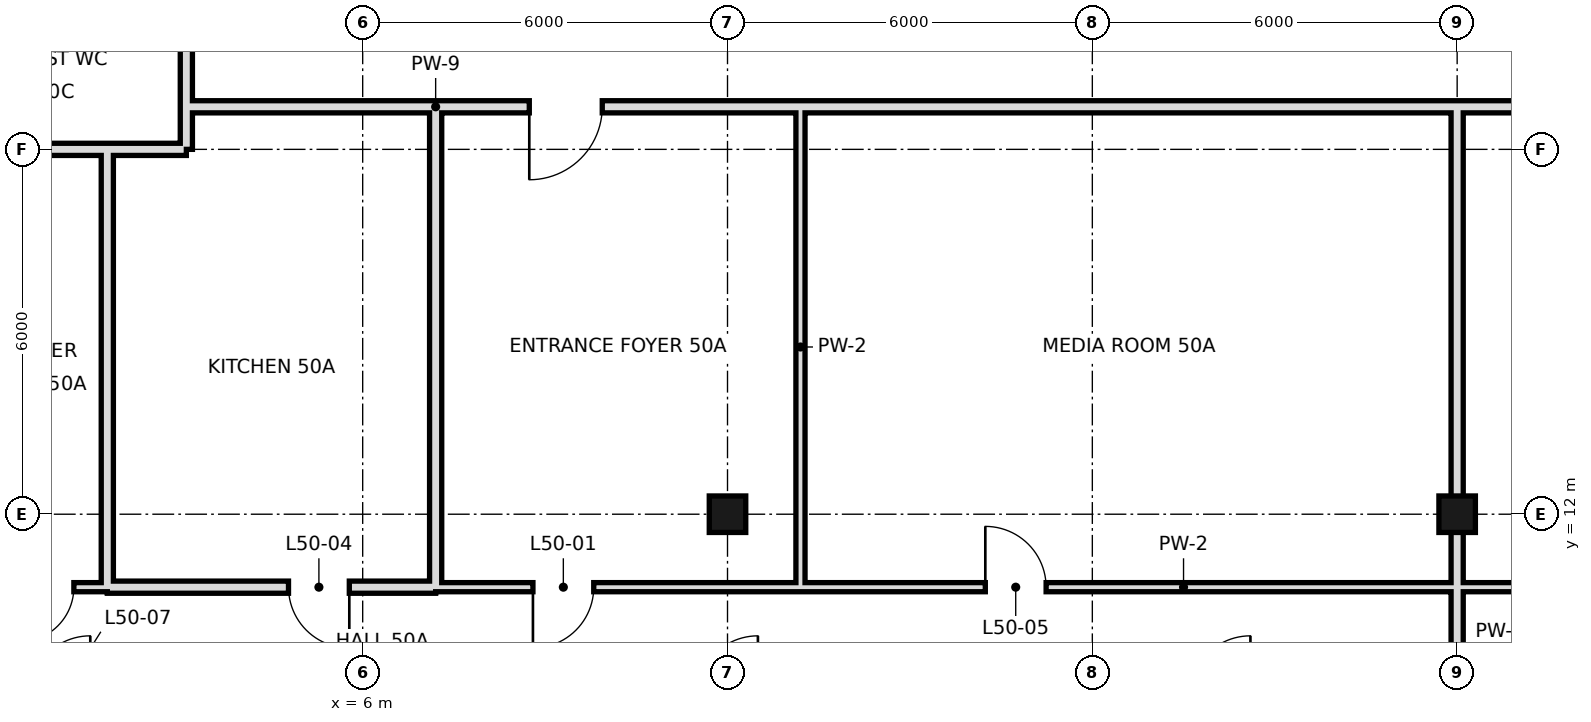
"""IFC4 building model, lengths in metres.
Left out: names, types, materials, properties, quantities, classifications, styles, units other than length and angle.
Written with IfcOpenShell. Run it as: python <this file> out.ifc"""

import sys

from ifc_helpers import new_model, si_unit, direction, frame, frame_2d, origin, origin_2d, place, context, subcontext, project, spatial, rectangle, hollow_rectangle, extrude, element, fill, save


model = new_model("IFC4")
c1 = context("Model", 3, precision=1e-05, world=origin(), true_north=direction((0.0, 1.0)))
c2 = subcontext(c1, "Body", "Model", "MODEL_VIEW")
j1 = project(units=[si_unit("LENGTHUNIT", "METRE"), si_unit("PLANEANGLEUNIT", "RADIAN")], contexts=[c1])
p1 = place(None, origin())
s1 = spatial("IfcSite", under=j1, at=p1, CompositionType="ELEMENT")
p2 = place(p1, origin())
s2 = spatial("IfcBuilding", under=s1, at=p2, CompositionType="ELEMENT")
p3 = place(p2, frame((0.0, 0.0, 215.4)))
s3 = spatial("IfcBuildingStorey", under=s2, at=p3, CompositionType="ELEMENT", Elevation=215.4)
for number, where, z_axis, x_axis in (
    (1, (12.0, 12.0, 0.0), (0.0, 0.0, 1.0), (1.0, 0.0, 0.0)),
    (2, (24.0, 12.0, 0.0), (0.0, 0.0, 1.0), (1.0, 0.0, 0.0)),
):
    element("IfcColumn", number, at=place(p3, frame(where, z_axis=z_axis, x_axis=x_axis)), inside=s3, PredefinedType="COLUMN", context=c2, shape_type="SweptSolid", body=[
        extrude(hollow_rectangle(XDim=0.6, YDim=0.6, WallThickness=0.028, at=origin_2d()), origin(), (0.0, 0.0, 1.0), 3.6),
    ])
p4 = place(p3, frame((1.8, 10.8, 0.0), z_axis=(0.0, 0.0, 1.0), x_axis=(0.0, 1.0, 0.0)))
e3 = element("IfcWall", 3, at=p4, inside=s3, PredefinedType="SOLIDWALL", context=c2, shape_type="SweptSolid", body=[
    extrude(rectangle(XDim=7.2, YDim=0.2, at=frame_2d((3.6, 0.0))), origin(), (0.0, 0.0, 1.0), 3.42),
])
p5 = place(p3, frame((13.2, 10.8, 0.0), z_axis=(0.0, 0.0, 1.0), x_axis=(0.0, 1.0, 0.0)))
e4 = element("IfcWall", 4, at=p5, inside=s3, PredefinedType="PARTITIONING", context=c2, shape_type="SweptSolid", body=[
    extrude(rectangle(XDim=7.9, YDim=0.15, at=frame_2d((3.95, 0.0))), origin(), (0.0, 0.0, 1.0), 3.42),
])
p6 = place(p3, frame((24.0, 0.0, 0.0), z_axis=(0.0, 0.0, 1.0), x_axis=(0.0, 1.0, 0.0)))
e5 = element("IfcWall", 5, at=p6, inside=s3, PredefinedType="SOLIDWALL", context=c2, shape_type="SweptSolid", body=[
    extrude(rectangle(XDim=18.7, YDim=0.2, at=frame_2d((9.35, 0.0))), origin(), (0.0, 0.0, 1.0), 2.72),
])
p7 = place(p3, frame((3.1, 18.7, 0.0), z_axis=(0.0, 0.0, 1.0), x_axis=(0.0, 1.0, 0.0)))
e6 = element("IfcWall", 6, at=p7, inside=s3, PredefinedType="SOLIDWALL", context=c2, shape_type="SweptSolid", body=[
    extrude(rectangle(XDim=15.5, YDim=0.2, at=frame_2d((7.75, 0.0))), origin(), (0.0, 0.0, 1.0), 2.97),
])
p8 = place(p7, frame((4.96, 0.0, 0.0)))
e7 = element("IfcOpeningElement", 7, at=p8, cuts=e6, PredefinedType="OPENING", context=c2, shape_type="SweptSolid", body=[
    extrude(rectangle(XDim=1.2, YDim=2.4, at=frame_2d((0.6, 1.2))), frame((0.0, 0.11, 0.0), z_axis=(0.0, -1.0, 0.0), x_axis=(1.0, 0.0, 0.0)), (0.0, 0.0, 1.0), 0.22),
])
p9 = place(p3, frame((3.1, 18.0, 0.0), z_axis=(0.0, 0.0, 1.0), x_axis=(0.0, 1.0, 0.0)))
e8 = element("IfcWall", 8, at=p9, inside=s3, PredefinedType="SOLIDWALL", context=c2, shape_type="SweptSolid", body=[
    extrude(rectangle(XDim=0.7, YDim=0.2, at=frame_2d((0.35, 0.0))), origin(), (0.0, 0.0, 1.0), 2.97),
])
p10 = place(p3, frame((7.2, 10.8, 0.0), z_axis=(0.0, 0.0, 1.0), x_axis=(0.0, 1.0, 0.0)))
e9 = element("IfcWall", 9, at=p10, inside=s3, PredefinedType="SOLIDWALL", context=c2, shape_type="SweptSolid", body=[
    extrude(rectangle(XDim=7.9, YDim=0.2, at=frame_2d((3.95, 0.0))), origin(), (0.0, 0.0, 1.0), 2.72),
])
p11 = place(p3, frame((1.8, 10.8, 0.0), z_axis=(0.0, 0.0, 1.0), x_axis=(1.0, 0.0, 0.0)))
e10 = element("IfcWall", 10, at=p11, inside=s3, PredefinedType="SOLIDWALL", context=c2, shape_type="SweptSolid", body=[
    extrude(rectangle(XDim=5.4, YDim=0.2, at=frame_2d((2.7, 0.0))), origin(), (0.0, 0.0, 1.0), 2.72),
])
p12 = place(p11, frame((2.98, 0.0, 0.0)))
e11 = element("IfcOpeningElement", 11, at=p12, cuts=e10, PredefinedType="OPENING", context=c2, shape_type="SweptSolid", body=[
    extrude(rectangle(XDim=1.0, YDim=2.4, at=frame_2d((0.5, 1.2))), frame((0.0, 0.11, 0.0), z_axis=(0.0, -1.0, 0.0), x_axis=(1.0, 0.0, 0.0)), (0.0, 0.0, 1.0), 0.22),
])
p13 = place(p3, frame((7.2, 10.8, 0.0), z_axis=(0.0, 0.0, 1.0), x_axis=(1.0, 0.0, 0.0)))
e12 = element("IfcWall", 12, at=p13, inside=s3, PredefinedType="PARTITIONING", context=c2, shape_type="SweptSolid", body=[
    extrude(rectangle(XDim=24.6, YDim=0.15, at=frame_2d((12.3, 0.0))), origin(), (0.0, 0.0, 1.0), 3.42),
])
p14 = place(p13, frame((1.6, 0.0, 0.0)))
e13 = element("IfcOpeningElement", 13, at=p14, cuts=e12, PredefinedType="OPENING", context=c2, shape_type="SweptSolid", body=[
    extrude(rectangle(XDim=1.0, YDim=2.4, at=frame_2d((0.5, 1.2))), frame((0.0, 0.085, 0.0), z_axis=(0.0, -1.0, 0.0), x_axis=(1.0, 0.0, 0.0)), (0.0, 0.0, 1.0), 0.17),
])
p15 = place(p13, frame((9.04, 0.0, 0.0)))
e14 = element("IfcOpeningElement", 14, at=p15, cuts=e12, PredefinedType="OPENING", context=c2, shape_type="SweptSolid", body=[
    extrude(rectangle(XDim=1.0, YDim=2.4, at=frame_2d((0.5, 1.2))), frame((0.0, 0.085, 0.0), z_axis=(0.0, -1.0, 0.0), x_axis=(1.0, 0.0, 0.0)), (0.0, 0.0, 1.0), 0.17),
])
p16 = place(p13, frame((21.46, 0.0, 0.0)))
e15 = element("IfcOpeningElement", 15, at=p16, cuts=e12, PredefinedType="OPENING", context=c2, shape_type="SweptSolid", body=[
    extrude(rectangle(XDim=1.0, YDim=2.4, at=frame_2d((0.5, 1.2))), frame((0.0, 0.085, 0.0), z_axis=(0.0, -1.0, 0.0), x_axis=(1.0, 0.0, 0.0)), (0.0, 0.0, 1.0), 0.17),
])
p17 = place(p3, frame((-0.6, 10.8, 0.0), z_axis=(0.0, 0.0, 1.0), x_axis=(1.0, 0.0, 0.0)))
e16 = element("IfcWall", 16, at=p17, inside=s3, PredefinedType="PARTITIONING", context=c2, shape_type="SweptSolid", body=[
    extrude(rectangle(XDim=2.4, YDim=0.15, at=frame_2d((1.2, 0.0))), origin(), (0.0, 0.0, 1.0), 3.42),
])
p18 = place(p17, frame((0.95, 0.0, 0.0)))
e17 = element("IfcOpeningElement", 17, at=p18, cuts=e16, PredefinedType="OPENING", context=c2, shape_type="SweptSolid", body=[
    extrude(rectangle(XDim=0.9, YDim=2.4, at=frame_2d((0.45, 1.2))), frame((0.0, 0.085, 0.0), z_axis=(0.0, -1.0, 0.0), x_axis=(1.0, 0.0, 0.0)), (0.0, 0.0, 1.0), 0.17),
])
p19 = place(p3, frame((1.8, 18.0, 0.0), z_axis=(0.0, 0.0, 1.0), x_axis=(1.0, 0.0, 0.0)))
e18 = element("IfcWall", 18, at=p19, inside=s3, PredefinedType="SOLIDWALL", context=c2, shape_type="SweptSolid", body=[
    extrude(rectangle(XDim=1.3, YDim=0.2, at=frame_2d((0.65, 0.0))), origin(), (0.0, 0.0, 1.0), 2.97),
])
p20 = place(p3, frame((-12.6, 18.0, 0.0), z_axis=(0.0, 0.0, 1.0), x_axis=(1.0, 0.0, 0.0)))
e19 = element("IfcWall", 19, at=p20, inside=s3, PredefinedType="SOLIDWALL", context=c2, shape_type="SweptSolid", body=[
    extrude(rectangle(XDim=14.4, YDim=0.2, at=frame_2d((7.2, 0.0))), origin(), (0.0, 0.0, 1.0), 2.72),
])
p21 = place(p3, frame((7.2, 18.7, 0.0), z_axis=(0.0, 0.0, 1.0), x_axis=(1.0, 0.0, 0.0)))
e20 = element("IfcWall", 20, at=p21, inside=s3, PredefinedType="SOLIDWALL", context=c2, shape_type="SweptSolid", body=[
    extrude(rectangle(XDim=37.7, YDim=0.2, at=frame_2d((18.85, 0.0))), origin(), (0.0, 0.0, 1.0), 2.72),
])
p22 = place(p21, frame((1.54, 0.0, 0.0)))
e21 = element("IfcOpeningElement", 21, at=p22, cuts=e20, PredefinedType="OPENING", context=c2, shape_type="SweptSolid", body=[
    extrude(rectangle(XDim=1.2, YDim=2.4, at=frame_2d((0.6, 1.2))), frame((0.0, 0.11, 0.0), z_axis=(0.0, -1.0, 0.0), x_axis=(1.0, 0.0, 0.0)), (0.0, 0.0, 1.0), 0.22),
])
p23 = place(p21, frame((30.26, 0.0, 0.0)))
e22 = element("IfcOpeningElement", 22, at=p23, cuts=e20, PredefinedType="OPENING", context=c2, shape_type="SweptSolid", body=[
    extrude(rectangle(XDim=1.2, YDim=2.4, at=frame_2d((0.6, 1.2))), frame((0.0, 0.11, 0.0), z_axis=(0.0, -1.0, 0.0), x_axis=(1.0, 0.0, 0.0)), (0.0, 0.0, 1.0), 0.22),
])
p24 = place(p3, frame((3.1, 18.7, 0.0), z_axis=(0.0, 0.0, 1.0), x_axis=(1.0, 0.0, 0.0)))
e23 = element("IfcWall", 23, at=p24, inside=s3, PredefinedType="SOLIDWALL", context=c2, shape_type="SweptSolid", body=[
    extrude(rectangle(XDim=4.1, YDim=0.2, at=frame_2d((2.05, 0.0))), origin(), (0.0, 0.0, 1.0), 2.72),
])
p25 = place(p14, frame((1.0, 0.0, 0.0), z_axis=(0.0, 0.0, 1.0), x_axis=(-1.0, 0.0, 0.0)))
e24 = element("IfcDoor", 24, at=p25, inside=s3, OperationType="SINGLE_SWING_RIGHT", PredefinedType="DOOR", context=c2, shape_type="SweptSolid", body=[
    extrude(rectangle(XDim=1.0, YDim=2.4, at=frame_2d((0.5, 1.2))), frame((0.0, 0.025, 0.0), z_axis=(0.0, -1.0, 0.0), x_axis=(1.0, 0.0, 0.0)), (0.0, 0.0, 1.0), 0.05),
])
fill(e13, e24)
p26 = place(p18, frame((0.9, 0.0, 0.0), z_axis=(0.0, 0.0, 1.0), x_axis=(-1.0, 0.0, 0.0)))
e25 = element("IfcDoor", 25, at=p26, inside=s3, OperationType="SINGLE_SWING_RIGHT", PredefinedType="DOOR", context=c2, shape_type="SweptSolid", body=[
    extrude(rectangle(XDim=0.9, YDim=2.4, at=frame_2d((0.45, 1.2))), frame((0.0, 0.025, 0.0), z_axis=(0.0, -1.0, 0.0), x_axis=(1.0, 0.0, 0.0)), (0.0, 0.0, 1.0), 0.05),
])
fill(e17, e25)
p27 = place(p12, origin())
e26 = element("IfcDoor", 26, at=p27, inside=s3, OperationType="SINGLE_SWING_RIGHT", PredefinedType="DOOR", context=c2, shape_type="SweptSolid", body=[
    extrude(rectangle(XDim=1.0, YDim=2.4, at=frame_2d((0.5, 1.2))), frame((0.0, 0.025, 0.0), z_axis=(0.0, -1.0, 0.0), x_axis=(1.0, 0.0, 0.0)), (0.0, 0.0, 1.0), 0.05),
])
fill(e11, e26)
p28 = place(p15, origin())
e27 = element("IfcDoor", 27, at=p28, inside=s3, OperationType="SINGLE_SWING_LEFT", PredefinedType="DOOR", context=c2, shape_type="SweptSolid", body=[
    extrude(rectangle(XDim=1.0, YDim=2.4, at=frame_2d((0.5, 1.2))), frame((0.0, 0.025, 0.0), z_axis=(0.0, -1.0, 0.0), x_axis=(1.0, 0.0, 0.0)), (0.0, 0.0, 1.0), 0.05),
])
fill(e14, e27)
p29 = place(p22, frame((1.2, 0.0, 0.0), z_axis=(0.0, 0.0, 1.0), x_axis=(-1.0, 0.0, 0.0)))
e28 = element("IfcDoor", 28, at=p29, inside=s3, OperationType="SINGLE_SWING_RIGHT", PredefinedType="DOOR", context=c2, shape_type="SweptSolid", body=[
    extrude(rectangle(XDim=1.2, YDim=2.4, at=frame_2d((0.6, 1.2))), frame((0.0, 0.025, 0.0), z_axis=(0.0, -1.0, 0.0), x_axis=(1.0, 0.0, 0.0)), (0.0, 0.0, 1.0), 0.05),
])
fill(e21, e28)
save(model, sys.argv[1])
